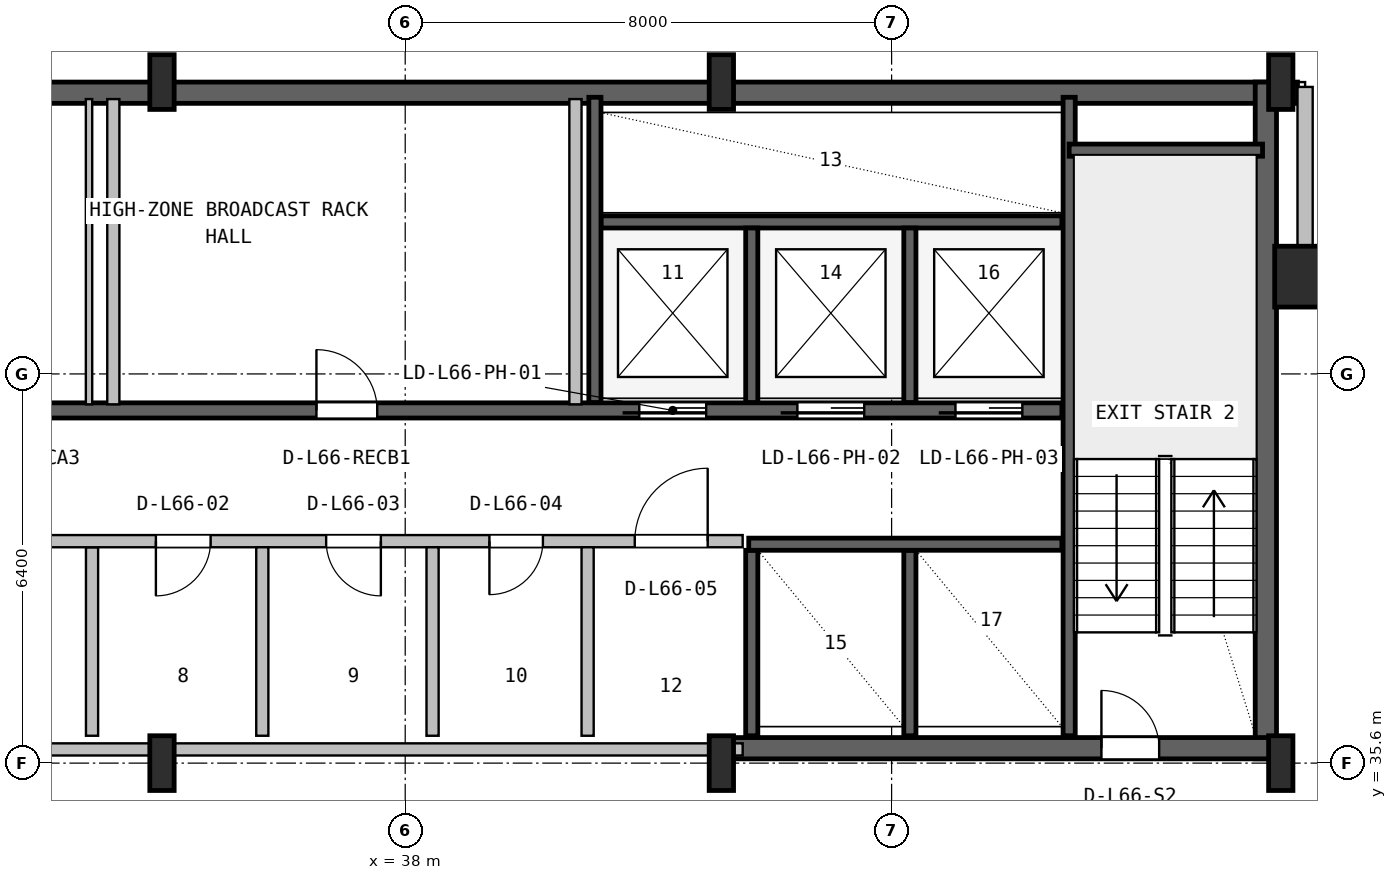
"""IFC4 building model, lengths in metres.
Left out: names, types, materials, properties, quantities, classifications, styles, units other than length and angle.
Written with IfcOpenShell. Run it as: python <this file> out.ifc"""

import sys

from ifc_helpers import new_model, si_unit, direction, frame, frame_2d, origin, origin_2d, place, context, subcontext, project, spatial, rectangle, hollow_rectangle, i_section, extrude, source, transform, mapped, element, fill, save


model = new_model("IFC4")
c1 = context("Model", 3, precision=1e-05, world=origin(), true_north=direction((0.0, 1.0)))
c2 = subcontext(c1, "Body", "Model", "MODEL_VIEW")
j1 = project(units=[si_unit("LENGTHUNIT", "METRE"), si_unit("PLANEANGLEUNIT", "RADIAN")], contexts=[c1])
p1 = place(None, origin())
s1 = spatial("IfcSite", under=j1, at=p1, CompositionType="ELEMENT")
p2 = place(p1, origin())
s2 = spatial("IfcBuilding", under=s1, at=p2, CompositionType="ELEMENT")
p3 = place(p2, frame((0.0, 0.0, 266.0)))
s3 = spatial("IfcBuildingStorey", under=s2, at=p3, CompositionType="ELEMENT", Elevation=266.0)
p4 = place(p3, frame((15.325, 46.625, 0.0), z_axis=(0.0, 0.0, 1.0), x_axis=(1.0, 0.0, 0.0)))
e1 = element("IfcWall", 1, at=p4, inside=s3, PredefinedType="SHEAR", context=c2, shape_type="SweptSolid", body=[
    extrude(rectangle(XDim=37.35, YDim=0.35, at=frame_2d((18.675, 0.0))), origin(), (0.0, 0.0, 1.0), 3.55),
])
p5 = place(p3, frame((52.155, 35.67, 0.0), z_axis=(0.0, 0.0, 1.0), x_axis=(0.0, 1.0, 0.0)))
e2 = element("IfcWall", 2, at=p5, inside=s3, PredefinedType="SHEAR", context=c2, shape_type="SweptSolid", body=[
    extrude(rectangle(XDim=11.13, YDim=0.35, at=frame_2d((5.565, 0.0))), origin(), (0.0, 0.0, 1.0), 3.55),
])
p6 = place(p3, frame((43.2, 35.845, 0.0), z_axis=(0.0, 0.0, 1.0), x_axis=(1.0, 0.0, 0.0)))
e3 = element("IfcWall", 3, at=p6, inside=s3, PredefinedType="SHEAR", context=c2, shape_type="SweptSolid", body=[
    extrude(rectangle(XDim=9.13, YDim=0.35, at=frame_2d((4.565, 0.0))), origin(), (0.0, 0.0, 1.0), 3.55),
])
p7 = place(p6, frame((6.25, 0.0, 0.0)))
e4 = element("IfcOpeningElement", 4, at=p7, cuts=e3, PredefinedType="OPENING", context=c2, shape_type="SweptSolid", body=[
    extrude(rectangle(XDim=0.95, YDim=2.1, at=frame_2d((0.475, 1.05))), frame((0.0, 0.185, 0.0), z_axis=(0.0, -1.0, 0.0), x_axis=(1.0, 0.0, 0.0)), (0.0, 0.0, 1.0), 0.37),
])
m1 = source(origin(), c2, "Body", "SweptSolid", [
    extrude(i_section(OverallWidth=0.4, OverallDepth=0.9, WebThickness=0.016, FlangeThickness=0.028, FilletRadius=0.016, at=origin_2d()), origin(), (0.0, 0.0, 1.0), 3.8),
])
for number, where, z_axis, x_axis in (
    (5, (34.0, 35.6, 0.0), (0.0, 0.0, 1.0), (1.0, 0.0, 0.0)),
    (6, (34.0, 46.8, 0.0), (0.0, 0.0, 1.0), (1.0, 0.0, 0.0)),
    (7, (43.2, 35.6, 0.0), (0.0, 0.0, 1.0), (1.0, 0.0, 0.0)),
    (8, (43.2, 46.8, 0.0), (0.0, 0.0, 1.0), (1.0, 0.0, 0.0)),
    (9, (52.4, 35.6, 0.0), (0.0, 0.0, 1.0), (1.0, 0.0, 0.0)),
    (10, (52.4, 46.8, 0.0), (0.0, 0.0, 1.0), (1.0, 0.0, 0.0)),
):
    element("IfcColumn", number, at=place(p3, frame(where, z_axis=z_axis, x_axis=x_axis)), inside=s3, PredefinedType="COLUMN", context=c2, shape_type="MappedRepresentation", body=[
        mapped(m1, transform((0.0, 0.0, 0.0), x_axis=(1.0, 0.0, 0.0), y_axis=(0.0, 1.0, 0.0), z_axis=(0.0, 0.0, 1.0), scale=1.0)),
    ])
m2 = source(origin(), c2, "Body", "SweptSolid", [
    extrude(hollow_rectangle(XDim=1.0, YDim=1.0, WallThickness=0.04, at=origin_2d()), origin(), (0.0, 0.0, 1.0), 3.8),
])
p8 = place(p3, frame((52.8, 43.6, 0.0), z_axis=(0.0, 0.0, 1.0), x_axis=(1.0, 0.0, 0.0)))
e11 = element("IfcColumn", 11, at=p8, inside=s3, PredefinedType="COLUMN", context=c2, shape_type="MappedRepresentation", body=[
    mapped(m2, transform((0.0, 0.0, 0.0), x_axis=(1.0, 0.0, 0.0), y_axis=(0.0, 1.0, 0.0), z_axis=(0.0, 0.0, 1.0), scale=1.0)),
])
p9 = place(p3, frame((52.93, 43.6, 0.0), z_axis=(0.0, 0.0, 1.0), x_axis=(1.0, 0.0, 0.0)))
e12 = element("IfcWall", 12, at=p9, inside=s3, PredefinedType="SOLIDWALL", context=c2, shape_type="SweptSolid", body=[
    extrude(rectangle(XDim=2.99, YDim=0.25, at=frame_2d((1.495, 0.0))), origin(), (0.0, 0.0, 1.0), 3.53),
])
p10 = place(p3, frame((52.8, 43.52, 0.0), z_axis=(0.0, 0.0, 1.0), x_axis=(0.0, 1.0, 0.0)))
e13 = element("IfcWall", 13, at=p10, inside=s3, PredefinedType="SOLIDWALL", context=c2, shape_type="SweptSolid", body=[
    extrude(rectangle(XDim=3.2, YDim=0.25, at=frame_2d((1.6, 0.0))), origin(), (0.0, 0.0, 1.0), 3.171),
])
p11 = place(p3, frame((48.92, 36.05, 0.0), z_axis=(0.0, 0.0, 1.0), x_axis=(0.0, 1.0, 0.0)))
e14 = element("IfcWall", 14, at=p11, inside=s3, PredefinedType="SHEAR", context=c2, shape_type="SweptSolid", body=[
    extrude(rectangle(XDim=10.5, YDim=0.2, at=frame_2d((5.25, 0.0))), origin(), (0.0, 0.0, 1.0), 3.55),
])
p12 = place(p3, frame((48.92, 45.68, 0.0), z_axis=(0.0, 0.0, 1.0), x_axis=(1.0, 0.0, 0.0)))
e15 = element("IfcWall", 15, at=p12, inside=s3, PredefinedType="SHEAR", context=c2, shape_type="SweptSolid", body=[
    extrude(rectangle(XDim=3.18, YDim=0.2, at=frame_2d((1.59, 0.0))), origin(), (0.0, 0.0, 1.0), 3.55),
])
p13 = place(p3, frame((24.98, 41.4, 0.0), z_axis=(0.0, 0.0, 1.0), x_axis=(1.0, 0.0, 0.0)))
e16 = element("IfcWall", 16, at=p13, inside=s3, PredefinedType="SHEAR", context=c2, shape_type="SweptSolid", body=[
    extrude(rectangle(XDim=23.82, YDim=0.25, at=frame_2d((11.91, 0.0))), origin(), (0.0, 0.0, 1.0), 3.55),
])
p14 = place(p13, frame((16.87, 0.0, 0.0)))
e17 = element("IfcOpeningElement", 17, at=p14, cuts=e16, PredefinedType="OPENING", context=c2, shape_type="SweptSolid", body=[
    extrude(rectangle(XDim=1.1, YDim=2.18, at=frame_2d((0.55, 1.09))), frame((0.0, 0.135, 0.0), z_axis=(0.0, -1.0, 0.0), x_axis=(1.0, 0.0, 0.0)), (0.0, 0.0, 1.0), 0.27),
])
p15 = place(p13, frame((19.47, 0.0, 0.0)))
e18 = element("IfcOpeningElement", 18, at=p15, cuts=e16, PredefinedType="OPENING", context=c2, shape_type="SweptSolid", body=[
    extrude(rectangle(XDim=1.1, YDim=2.18, at=frame_2d((0.55, 1.09))), frame((0.0, 0.135, 0.0), z_axis=(0.0, -1.0, 0.0), x_axis=(1.0, 0.0, 0.0)), (0.0, 0.0, 1.0), 0.27),
])
p16 = place(p13, frame((22.07, 0.0, 0.0)))
e19 = element("IfcOpeningElement", 19, at=p16, cuts=e16, PredefinedType="OPENING", context=c2, shape_type="SweptSolid", body=[
    extrude(rectangle(XDim=1.1, YDim=2.18, at=frame_2d((0.55, 1.09))), frame((0.0, 0.135, 0.0), z_axis=(0.0, -1.0, 0.0), x_axis=(1.0, 0.0, 0.0)), (0.0, 0.0, 1.0), 0.27),
])
p17 = place(p13, frame((0.96, 0.0, 0.0)))
e20 = element("IfcOpeningElement", 20, at=p17, cuts=e16, PredefinedType="OPENING", context=c2, shape_type="SweptSolid", body=[
    extrude(rectangle(XDim=1.0, YDim=2.08, at=frame_2d((0.5, 1.04))), frame((0.0, 0.135, 0.0), z_axis=(0.0, -1.0, 0.0), x_axis=(1.0, 0.0, 0.0)), (0.0, 0.0, 1.0), 0.27),
])
p18 = place(p13, frame((3.56, 0.0, 0.0)))
e21 = element("IfcOpeningElement", 21, at=p18, cuts=e16, PredefinedType="OPENING", context=c2, shape_type="SweptSolid", body=[
    extrude(rectangle(XDim=1.0, YDim=2.08, at=frame_2d((0.5, 1.04))), frame((0.0, 0.135, 0.0), z_axis=(0.0, -1.0, 0.0), x_axis=(1.0, 0.0, 0.0)), (0.0, 0.0, 1.0), 0.27),
])
p19 = place(p13, frame((6.16, 0.0, 0.0)))
e22 = element("IfcOpeningElement", 22, at=p19, cuts=e16, PredefinedType="OPENING", context=c2, shape_type="SweptSolid", body=[
    extrude(rectangle(XDim=0.92, YDim=2.08, at=frame_2d((0.46, 1.04))), frame((0.0, 0.135, 0.0), z_axis=(0.0, -1.0, 0.0), x_axis=(1.0, 0.0, 0.0)), (0.0, 0.0, 1.0), 0.27),
])
p20 = place(p13, frame((11.56, 0.0, 0.0)))
e23 = element("IfcOpeningElement", 23, at=p20, cuts=e16, PredefinedType="OPENING", context=c2, shape_type="SweptSolid", body=[
    extrude(rectangle(XDim=1.0, YDim=2.08, at=frame_2d((0.5, 1.04))), frame((0.0, 0.135, 0.0), z_axis=(0.0, -1.0, 0.0), x_axis=(1.0, 0.0, 0.0)), (0.0, 0.0, 1.0), 0.27),
])
p21 = place(p3, frame((41.22, 44.5, 0.0), z_axis=(0.0, 0.0, 1.0), x_axis=(1.0, 0.0, 0.0)))
e24 = element("IfcWall", 24, at=p21, inside=s3, PredefinedType="SHEAR", context=c2, shape_type="SweptSolid", body=[
    extrude(rectangle(XDim=7.58, YDim=0.2, at=frame_2d((3.79, 0.0))), origin(), (0.0, 0.0, 1.0), 3.55),
])
p22 = place(p3, frame((41.12, 41.53, 0.0), z_axis=(0.0, 0.0, 1.0), x_axis=(0.0, 1.0, 0.0)))
e25 = element("IfcWall", 25, at=p22, inside=s3, PredefinedType="SHEAR", context=c2, shape_type="SweptSolid", body=[
    extrude(rectangle(XDim=5.02, YDim=0.2, at=frame_2d((2.51, 0.0))), origin(), (0.0, 0.0, 1.0), 3.55),
])
for number, where, z_axis, x_axis in (
    (26, (43.7, 41.53, 0.0), (0.0, 0.0, 1.0), (0.0, 1.0, 0.0)),
    (27, (46.3, 41.53, 0.0), (0.0, 0.0, 1.0), (0.0, 1.0, 0.0)),
):
    element("IfcWall", number, at=place(p3, frame(where, z_axis=z_axis, x_axis=x_axis)), inside=s3, PredefinedType="SHEAR", context=c2, shape_type="SweptSolid", body=[
        extrude(rectangle(XDim=2.87, YDim=0.2, at=frame_2d((1.435, 0.0))), origin(), (0.0, 0.0, 1.0), 3.55),
    ])
for number, where, z_axis, x_axis in (
    (28, (43.7, 36.05, 0.0), (0.0, 0.0, 1.0), (0.0, 1.0, 0.0)),
    (29, (46.3, 36.05, 0.0), (0.0, 0.0, 1.0), (0.0, 1.0, 0.0)),
):
    element("IfcWall", number, at=place(p3, frame(where, z_axis=z_axis, x_axis=x_axis)), inside=s3, PredefinedType="SHEAR", context=c2, shape_type="SweptSolid", body=[
        extrude(rectangle(XDim=3.05, YDim=0.2, at=frame_2d((1.525, 0.0))), origin(), (0.0, 0.0, 1.0), 3.55),
    ])
p23 = place(p3, frame((43.65, 39.2, 0.0), z_axis=(0.0, 0.0, 1.0), x_axis=(1.0, 0.0, 0.0)))
e30 = element("IfcWall", 30, at=p23, inside=s3, PredefinedType="SHEAR", context=c2, shape_type="SweptSolid", body=[
    extrude(rectangle(XDim=5.15, YDim=0.2, at=frame_2d((2.575, 0.0))), origin(), (0.0, 0.0, 1.0), 3.55),
])
p24 = place(p3, frame((29.85, 35.825, 0.0), z_axis=(0.0, 0.0, 1.0), x_axis=(1.0, 0.0, 0.0)))
e31 = element("IfcWall", 31, at=p24, inside=s3, PredefinedType="SOLIDWALL", context=c2, shape_type="SweptSolid", body=[
    extrude(rectangle(XDim=13.7, YDim=0.2, at=frame_2d((6.85, 0.0))), origin(), (0.0, 0.0, 1.0), 2.575),
])
p25 = place(p3, frame((32.85, 36.05, 0.0), z_axis=(0.0, 0.0, 1.0), x_axis=(0.0, 1.0, 0.0)))
e32 = element("IfcWall", 32, at=p25, inside=s3, PredefinedType="PLUMBINGWALL", context=c2, shape_type="SweptSolid", body=[
    extrude(rectangle(XDim=3.1, YDim=0.2, at=frame_2d((1.55, 0.0))), origin(), (0.0, 0.0, 1.0), 3.53),
])
p26 = place(p3, frame((29.85, 39.25, 0.0), z_axis=(0.0, 0.0, 1.0), x_axis=(1.0, 0.0, 0.0)))
e33 = element("IfcWall", 33, at=p26, inside=s3, PredefinedType="SOLIDWALL", context=c2, shape_type="SweptSolid", body=[
    extrude(rectangle(XDim=13.7, YDim=0.2, at=frame_2d((6.85, 0.0))), origin(), (0.0, 0.0, 1.0), 3.53),
])
p27 = place(p26, frame((1.05, 0.0, 0.0)))
e34 = element("IfcOpeningElement", 34, at=p27, cuts=e33, PredefinedType="OPENING", context=c2, shape_type="SweptSolid", body=[
    extrude(rectangle(XDim=0.9, YDim=2.06, at=frame_2d((0.45, 1.03))), frame((0.0, 0.11, 0.0), z_axis=(0.0, -1.0, 0.0), x_axis=(1.0, 0.0, 0.0)), (0.0, 0.0, 1.0), 0.22),
])
p28 = place(p26, frame((4.05, 0.0, 0.0)))
e35 = element("IfcOpeningElement", 35, at=p28, cuts=e33, PredefinedType="OPENING", context=c2, shape_type="SweptSolid", body=[
    extrude(rectangle(XDim=0.9, YDim=2.06, at=frame_2d((0.45, 1.03))), frame((0.0, 0.11, 0.0), z_axis=(0.0, -1.0, 0.0), x_axis=(1.0, 0.0, 0.0)), (0.0, 0.0, 1.0), 0.22),
])
p29 = place(p26, frame((6.85, 0.0, 0.0)))
e36 = element("IfcOpeningElement", 36, at=p29, cuts=e33, PredefinedType="OPENING", context=c2, shape_type="SweptSolid", body=[
    extrude(rectangle(XDim=0.9, YDim=2.06, at=frame_2d((0.45, 1.03))), frame((0.0, 0.11, 0.0), z_axis=(0.0, -1.0, 0.0), x_axis=(1.0, 0.0, 0.0)), (0.0, 0.0, 1.0), 0.22),
])
p30 = place(p26, frame((9.535, 0.0, 0.0)))
e37 = element("IfcOpeningElement", 37, at=p30, cuts=e33, PredefinedType="OPENING", context=c2, shape_type="SweptSolid", body=[
    extrude(rectangle(XDim=0.88, YDim=2.06, at=frame_2d((0.44, 1.03))), frame((0.0, 0.11, 0.0), z_axis=(0.0, -1.0, 0.0), x_axis=(1.0, 0.0, 0.0)), (0.0, 0.0, 1.0), 0.22),
])
p31 = place(p26, frame((11.925, 0.0, 0.0)))
e38 = element("IfcOpeningElement", 38, at=p31, cuts=e33, PredefinedType="OPENING", context=c2, shape_type="SweptSolid", body=[
    extrude(rectangle(XDim=1.2, YDim=2.1, at=frame_2d((0.6, 1.05))), frame((0.0, 0.11, 0.0), z_axis=(0.0, -1.0, 0.0), x_axis=(1.0, 0.0, 0.0)), (0.0, 0.0, 1.0), 0.22),
])
for number, where, z_axis, x_axis in (
    (39, (35.65, 36.05, 0.0), (0.0, 0.0, 1.0), (0.0, 1.0, 0.0)),
    (40, (38.45, 36.05, 0.0), (0.0, 0.0, 1.0), (0.0, 1.0, 0.0)),
):
    element("IfcWall", number, at=place(p3, frame(where, z_axis=z_axis, x_axis=x_axis)), inside=s3, PredefinedType="PLUMBINGWALL", context=c2, shape_type="SweptSolid", body=[
        extrude(rectangle(XDim=3.1, YDim=0.2, at=frame_2d((1.55, 0.0))), origin(), (0.0, 0.0, 1.0), 3.53),
    ])
p32 = place(p3, frame((41.0, 36.05, 0.0), z_axis=(0.0, 0.0, 1.0), x_axis=(0.0, 1.0, 0.0)))
e41 = element("IfcWall", 41, at=p32, inside=s3, PredefinedType="SOLIDWALL", context=c2, shape_type="SweptSolid", body=[
    extrude(rectangle(XDim=3.1, YDim=0.2, at=frame_2d((1.55, 0.0))), origin(), (0.0, 0.0, 1.0), 3.53),
])
p33 = place(p3, frame((32.8, 41.5, 0.0), z_axis=(0.0, 0.0, 1.0), x_axis=(0.0, 1.0, 0.0)))
e42 = element("IfcWall", 42, at=p33, inside=s3, PredefinedType="PARTITIONING", context=c2, shape_type="SweptSolid", body=[
    extrude(rectangle(XDim=5.02, YDim=0.105, at=frame_2d((2.51, 0.0))), origin(), (0.0, 0.0, 1.0), 3.53),
])
for number, where, z_axis, x_axis in (
    (43, (40.8, 41.5, 0.0), (0.0, 0.0, 1.0), (0.0, 1.0, 0.0)),
    (44, (33.2, 41.5, 0.0), (0.0, 0.0, 1.0), (0.0, 1.0, 0.0)),
):
    element("IfcWall", number, at=place(p3, frame(where, z_axis=z_axis, x_axis=x_axis)), inside=s3, PredefinedType="SOLIDWALL", context=c2, shape_type="SweptSolid", body=[
        extrude(rectangle(XDim=5.02, YDim=0.2, at=frame_2d((2.51, 0.0))), origin(), (0.0, 0.0, 1.0), 3.53),
    ])
m3 = source(origin(), c2, "Body", "SweptSolid", [
    extrude(rectangle(XDim=0.95, YDim=2.1, at=frame_2d((0.475, 1.05))), frame((0.0, 0.025, 0.0), z_axis=(0.0, -1.0, 0.0), x_axis=(1.0, 0.0, 0.0)), (0.0, 0.0, 1.0), 0.05),
])
p34 = place(p7, origin())
e45 = element("IfcDoor", 45, at=p34, inside=s3, OperationType="SINGLE_SWING_LEFT", PredefinedType="DOOR", context=c2, shape_type="MappedRepresentation", body=[
    mapped(m3, transform((0.0, 0.0, 0.0), x_axis=(1.0, 0.0, 0.0), y_axis=(0.0, 1.0, 0.0), z_axis=(0.0, 0.0, 1.0), scale=1.0)),
])
fill(e4, e45)
m4 = source(origin(), c2, "Body", "SweptSolid", [
    extrude(rectangle(XDim=1.1, YDim=2.18, at=frame_2d((0.55, 1.09))), frame((0.0, 0.025, 0.0), z_axis=(0.0, -1.0, 0.0), x_axis=(1.0, 0.0, 0.0)), (0.0, 0.0, 1.0), 0.05),
])
p35 = place(p14, frame((1.1, 0.0, 0.0), z_axis=(0.0, 0.0, 1.0), x_axis=(-1.0, 0.0, 0.0)))
e46 = element("IfcDoor", 46, at=p35, inside=s3, OperationType="SLIDING_TO_LEFT", PredefinedType="DOOR", context=c2, shape_type="MappedRepresentation", body=[
    mapped(m4, transform((0.0, 0.0, 0.0), x_axis=(1.0, 0.0, 0.0), y_axis=(0.0, 1.0, 0.0), z_axis=(0.0, 0.0, 1.0), scale=1.0)),
])
fill(e17, e46)
p36 = place(p15, frame((1.1, 0.0, 0.0), z_axis=(0.0, 0.0, 1.0), x_axis=(-1.0, 0.0, 0.0)))
e47 = element("IfcDoor", 47, at=p36, inside=s3, OperationType="SLIDING_TO_LEFT", PredefinedType="DOOR", context=c2, shape_type="MappedRepresentation", body=[
    mapped(m4, transform((0.0, 0.0, 0.0), x_axis=(1.0, 0.0, 0.0), y_axis=(0.0, 1.0, 0.0), z_axis=(0.0, 0.0, 1.0), scale=1.0)),
])
fill(e18, e47)
p37 = place(p16, frame((1.1, 0.0, 0.0), z_axis=(0.0, 0.0, 1.0), x_axis=(-1.0, 0.0, 0.0)))
e48 = element("IfcDoor", 48, at=p37, inside=s3, OperationType="SLIDING_TO_LEFT", PredefinedType="DOOR", context=c2, shape_type="MappedRepresentation", body=[
    mapped(m4, transform((0.0, 0.0, 0.0), x_axis=(1.0, 0.0, 0.0), y_axis=(0.0, 1.0, 0.0), z_axis=(0.0, 0.0, 1.0), scale=1.0)),
])
fill(e19, e48)
m5 = source(origin(), c2, "Body", "SweptSolid", [
    extrude(rectangle(XDim=1.0, YDim=2.08, at=frame_2d((0.5, 1.04))), frame((0.0, 0.025, 0.0), z_axis=(0.0, -1.0, 0.0), x_axis=(1.0, 0.0, 0.0)), (0.0, 0.0, 1.0), 0.05),
])
p38 = place(p20, origin())
e49 = element("IfcDoor", 49, at=p38, inside=s3, OperationType="SINGLE_SWING_LEFT", PredefinedType="DOOR", context=c2, shape_type="MappedRepresentation", body=[
    mapped(m5, transform((0.0, 0.0, 0.0), x_axis=(1.0, 0.0, 0.0), y_axis=(0.0, 1.0, 0.0), z_axis=(0.0, 0.0, 1.0), scale=1.0)),
])
fill(e23, e49)
m6 = source(origin(), c2, "Body", "SweptSolid", [
    extrude(rectangle(XDim=0.9, YDim=2.06, at=frame_2d((0.45, 1.03))), frame((0.0, 0.025, 0.0), z_axis=(0.0, -1.0, 0.0), x_axis=(1.0, 0.0, 0.0)), (0.0, 0.0, 1.0), 0.05),
])
p39 = place(p28, frame((0.9, 0.0, 0.0), z_axis=(0.0, 0.0, 1.0), x_axis=(-1.0, 0.0, 0.0)))
e50 = element("IfcDoor", 50, at=p39, inside=s3, OperationType="SINGLE_SWING_LEFT", PredefinedType="DOOR", context=c2, shape_type="MappedRepresentation", body=[
    mapped(m6, transform((0.0, 0.0, 0.0), x_axis=(1.0, 0.0, 0.0), y_axis=(0.0, 1.0, 0.0), z_axis=(0.0, 0.0, 1.0), scale=1.0)),
])
fill(e35, e50)
p40 = place(p29, frame((0.9, 0.0, 0.0), z_axis=(0.0, 0.0, 1.0), x_axis=(-1.0, 0.0, 0.0)))
e51 = element("IfcDoor", 51, at=p40, inside=s3, OperationType="SINGLE_SWING_RIGHT", PredefinedType="DOOR", context=c2, shape_type="MappedRepresentation", body=[
    mapped(m6, transform((0.0, 0.0, 0.0), x_axis=(1.0, 0.0, 0.0), y_axis=(0.0, 1.0, 0.0), z_axis=(0.0, 0.0, 1.0), scale=1.0)),
])
fill(e36, e51)
m7 = source(origin(), c2, "Body", "SweptSolid", [
    extrude(rectangle(XDim=0.88, YDim=2.06, at=frame_2d((0.44, 1.03))), frame((0.0, 0.025, 0.0), z_axis=(0.0, -1.0, 0.0), x_axis=(1.0, 0.0, 0.0)), (0.0, 0.0, 1.0), 0.05),
])
p41 = place(p30, frame((0.88, 0.0, 0.0), z_axis=(0.0, 0.0, 1.0), x_axis=(-1.0, 0.0, 0.0)))
e52 = element("IfcDoor", 52, at=p41, inside=s3, OperationType="SINGLE_SWING_LEFT", PredefinedType="DOOR", context=c2, shape_type="MappedRepresentation", body=[
    mapped(m7, transform((0.0, 0.0, 0.0), x_axis=(1.0, 0.0, 0.0), y_axis=(0.0, 1.0, 0.0), z_axis=(0.0, 0.0, 1.0), scale=1.0)),
])
fill(e37, e52)
m8 = source(origin(), c2, "Body", "SweptSolid", [
    extrude(rectangle(XDim=1.2, YDim=2.1, at=frame_2d((0.6, 1.05))), frame((0.0, 0.025, 0.0), z_axis=(0.0, -1.0, 0.0), x_axis=(1.0, 0.0, 0.0)), (0.0, 0.0, 1.0), 0.05),
])
p42 = place(p31, origin())
e53 = element("IfcDoor", 53, at=p42, inside=s3, OperationType="SINGLE_SWING_RIGHT", PredefinedType="DOOR", context=c2, shape_type="MappedRepresentation", body=[
    mapped(m8, transform((0.0, 0.0, 0.0), x_axis=(1.0, 0.0, 0.0), y_axis=(0.0, 1.0, 0.0), z_axis=(0.0, 0.0, 1.0), scale=1.0)),
])
fill(e38, e53)
save(model, sys.argv[1])
